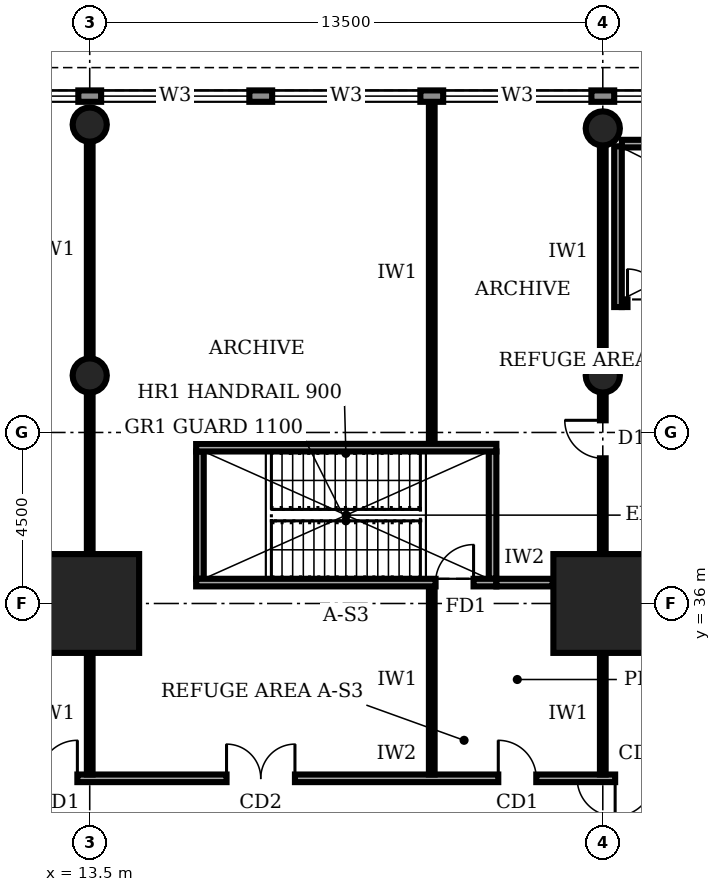
"""IFC4 building model, lengths in metres.
Left out: names, types, materials, properties, quantities, classifications, styles, units other than length and angle.
Written with IfcOpenShell. Run it as: python <this file> out.ifc"""

import sys

from ifc_helpers import new_model, si_unit, direction, frame, frame_2d, origin, origin_2d, place, context, subcontext, project, spatial, rectangle, circle, extrude, element, fill, save


model = new_model("IFC4")
c1 = context("Model", 3, precision=1e-05, world=origin(), true_north=direction((0.0, 1.0)))
c2 = subcontext(c1, "Body", "Model", "MODEL_VIEW")
j1 = project(units=[si_unit("LENGTHUNIT", "METRE"), si_unit("PLANEANGLEUNIT", "RADIAN")], contexts=[c1])
p1 = place(None, origin())
s1 = spatial("IfcSite", under=j1, at=p1, CompositionType="ELEMENT")
p2 = place(p1, origin())
s2 = spatial("IfcBuilding", under=s1, at=p2, CompositionType="ELEMENT")
p3 = place(p2, frame((0.0, 0.0, 16.0)))
s3 = spatial("IfcBuildingStorey", under=s2, at=p3, CompositionType="ELEMENT", Elevation=16.0)
for number, where, z_axis, x_axis in (
    (1, (13.5, 36.0, 0.0), (0.0, 0.0, 1.0), (1.0, 0.0, 0.0)),
    (2, (27.0, 36.0, 0.0), (0.0, 0.0, 1.0), (1.0, 0.0, 0.0)),
):
    element("IfcColumn", number, at=place(p3, frame(where, z_axis=z_axis, x_axis=x_axis)), inside=s3, PredefinedType="COLUMN", context=c2, shape_type="SweptSolid", body=[
        extrude(rectangle(XDim=2.6, YDim=2.6, at=origin_2d()), origin(), (0.0, 0.0, 1.0), 5.0),
    ])
for number, where, z_axis, x_axis in (
    (3, (13.5, 42.0, 0.0), (0.0, 0.0, 1.0), (1.0, 0.0, 0.0)),
    (4, (27.0, 42.0, 0.0), (0.0, 0.0, 1.0), (1.0, 0.0, 0.0)),
    (5, (13.5, 48.6, 0.0), (0.0, 0.0, 1.0), (1.0, 0.0, 0.0)),
    (6, (27.0, 48.5, 0.0), (0.0, 0.0, 1.0), (1.0, 0.0, 0.0)),
):
    element("IfcColumn", number, at=place(p3, frame(where, z_axis=z_axis, x_axis=x_axis)), inside=s3, PredefinedType="COLUMN", context=c2, shape_type="SweptSolid", body=[
        extrude(circle(Radius=0.45, at=origin_2d()), origin(), (0.0, 0.0, 1.0), 5.0),
    ])
p4 = place(p3, frame((98.98, 49.35, 0.0), z_axis=(0.0, 0.0, 1.0), x_axis=(-1.0, 0.0, 0.0)))
e7 = element("IfcWall", 7, at=p4, inside=s3, PredefinedType="STANDARD", context=c2, shape_type="SweptSolid", body=[
    extrude(rectangle(XDim=98.96, YDim=0.3, at=frame_2d((49.48, 0.0))), origin(), (0.0, 0.0, 1.0), 4.7),
])
p5 = place(p4, frame((94.78, 0.0, 0.95)))
e8 = element("IfcOpeningElement", 8, at=p5, cuts=e7, PredefinedType="OPENING", context=c2, shape_type="SweptSolid", body=[
    extrude(rectangle(XDim=3.9, YDim=1.8, at=frame_2d((1.95, 0.9))), frame((0.0, 0.16, 0.0), z_axis=(0.0, -1.0, 0.0), x_axis=(1.0, 0.0, 0.0)), (0.0, 0.0, 1.0), 0.32),
])
p6 = place(p4, frame((90.28, 0.0, 0.95)))
e9 = element("IfcOpeningElement", 9, at=p6, cuts=e7, PredefinedType="OPENING", context=c2, shape_type="SweptSolid", body=[
    extrude(rectangle(XDim=3.9, YDim=1.8, at=frame_2d((1.95, 0.9))), frame((0.0, 0.16, 0.0), z_axis=(0.0, -1.0, 0.0), x_axis=(1.0, 0.0, 0.0)), (0.0, 0.0, 1.0), 0.32),
])
p7 = place(p4, frame((85.78, 0.0, 0.95)))
e10 = element("IfcOpeningElement", 10, at=p7, cuts=e7, PredefinedType="OPENING", context=c2, shape_type="SweptSolid", body=[
    extrude(rectangle(XDim=3.9, YDim=1.8, at=frame_2d((1.95, 0.9))), frame((0.0, 0.16, 0.0), z_axis=(0.0, -1.0, 0.0), x_axis=(1.0, 0.0, 0.0)), (0.0, 0.0, 1.0), 0.32),
])
p8 = place(p4, frame((81.28, 0.0, 0.95)))
e11 = element("IfcOpeningElement", 11, at=p8, cuts=e7, PredefinedType="OPENING", context=c2, shape_type="SweptSolid", body=[
    extrude(rectangle(XDim=3.9, YDim=1.8, at=frame_2d((1.95, 0.9))), frame((0.0, 0.16, 0.0), z_axis=(0.0, -1.0, 0.0), x_axis=(1.0, 0.0, 0.0)), (0.0, 0.0, 1.0), 0.32),
])
p9 = place(p4, frame((76.78, 0.0, 0.95)))
e12 = element("IfcOpeningElement", 12, at=p9, cuts=e7, PredefinedType="OPENING", context=c2, shape_type="SweptSolid", body=[
    extrude(rectangle(XDim=3.9, YDim=1.8, at=frame_2d((1.95, 0.9))), frame((0.0, 0.16, 0.0), z_axis=(0.0, -1.0, 0.0), x_axis=(1.0, 0.0, 0.0)), (0.0, 0.0, 1.0), 0.32),
])
p10 = place(p4, frame((72.28, 0.0, 0.95)))
e13 = element("IfcOpeningElement", 13, at=p10, cuts=e7, PredefinedType="OPENING", context=c2, shape_type="SweptSolid", body=[
    extrude(rectangle(XDim=3.9, YDim=1.8, at=frame_2d((1.95, 0.9))), frame((0.0, 0.16, 0.0), z_axis=(0.0, -1.0, 0.0), x_axis=(1.0, 0.0, 0.0)), (0.0, 0.0, 1.0), 0.32),
])
p11 = place(p4, frame((67.78, 0.0, 0.95)))
e14 = element("IfcOpeningElement", 14, at=p11, cuts=e7, PredefinedType="OPENING", context=c2, shape_type="SweptSolid", body=[
    extrude(rectangle(XDim=3.9, YDim=1.8, at=frame_2d((1.95, 0.9))), frame((0.0, 0.16, 0.0), z_axis=(0.0, -1.0, 0.0), x_axis=(1.0, 0.0, 0.0)), (0.0, 0.0, 1.0), 0.32),
])
p12 = place(p4, frame((63.28, 0.0, 0.95)))
e15 = element("IfcOpeningElement", 15, at=p12, cuts=e7, PredefinedType="OPENING", context=c2, shape_type="SweptSolid", body=[
    extrude(rectangle(XDim=3.9, YDim=1.8, at=frame_2d((1.95, 0.9))), frame((0.0, 0.16, 0.0), z_axis=(0.0, -1.0, 0.0), x_axis=(1.0, 0.0, 0.0)), (0.0, 0.0, 1.0), 0.32),
])
p13 = place(p4, frame((58.78, 0.0, 0.95)))
e16 = element("IfcOpeningElement", 16, at=p13, cuts=e7, PredefinedType="OPENING", context=c2, shape_type="SweptSolid", body=[
    extrude(rectangle(XDim=3.9, YDim=1.8, at=frame_2d((1.95, 0.9))), frame((0.0, 0.16, 0.0), z_axis=(0.0, -1.0, 0.0), x_axis=(1.0, 0.0, 0.0)), (0.0, 0.0, 1.0), 0.32),
])
p14 = place(p4, frame((54.28, 0.0, 0.95)))
e17 = element("IfcOpeningElement", 17, at=p14, cuts=e7, PredefinedType="OPENING", context=c2, shape_type="SweptSolid", body=[
    extrude(rectangle(XDim=3.9, YDim=1.8, at=frame_2d((1.95, 0.9))), frame((0.0, 0.16, 0.0), z_axis=(0.0, -1.0, 0.0), x_axis=(1.0, 0.0, 0.0)), (0.0, 0.0, 1.0), 0.32),
])
p15 = place(p4, frame((49.78, 0.0, 0.95)))
e18 = element("IfcOpeningElement", 18, at=p15, cuts=e7, PredefinedType="OPENING", context=c2, shape_type="SweptSolid", body=[
    extrude(rectangle(XDim=3.9, YDim=1.8, at=frame_2d((1.95, 0.9))), frame((0.0, 0.16, 0.0), z_axis=(0.0, -1.0, 0.0), x_axis=(1.0, 0.0, 0.0)), (0.0, 0.0, 1.0), 0.32),
])
p16 = place(p4, frame((45.28, 0.0, 0.95)))
e19 = element("IfcOpeningElement", 19, at=p16, cuts=e7, PredefinedType="OPENING", context=c2, shape_type="SweptSolid", body=[
    extrude(rectangle(XDim=3.9, YDim=1.8, at=frame_2d((1.95, 0.9))), frame((0.0, 0.16, 0.0), z_axis=(0.0, -1.0, 0.0), x_axis=(1.0, 0.0, 0.0)), (0.0, 0.0, 1.0), 0.32),
])
p17 = place(p4, frame((40.78, 0.0, 0.95)))
e20 = element("IfcOpeningElement", 20, at=p17, cuts=e7, PredefinedType="OPENING", context=c2, shape_type="SweptSolid", body=[
    extrude(rectangle(XDim=3.9, YDim=1.8, at=frame_2d((1.95, 0.9))), frame((0.0, 0.16, 0.0), z_axis=(0.0, -1.0, 0.0), x_axis=(1.0, 0.0, 0.0)), (0.0, 0.0, 1.0), 0.32),
])
p18 = place(p4, frame((36.28, 0.0, 0.95)))
e21 = element("IfcOpeningElement", 21, at=p18, cuts=e7, PredefinedType="OPENING", context=c2, shape_type="SweptSolid", body=[
    extrude(rectangle(XDim=3.9, YDim=1.8, at=frame_2d((1.95, 0.9))), frame((0.0, 0.16, 0.0), z_axis=(0.0, -1.0, 0.0), x_axis=(1.0, 0.0, 0.0)), (0.0, 0.0, 1.0), 0.32),
])
p19 = place(p4, frame((31.78, 0.0, 0.95)))
e22 = element("IfcOpeningElement", 22, at=p19, cuts=e7, PredefinedType="OPENING", context=c2, shape_type="SweptSolid", body=[
    extrude(rectangle(XDim=3.9, YDim=1.8, at=frame_2d((1.95, 0.9))), frame((0.0, 0.16, 0.0), z_axis=(0.0, -1.0, 0.0), x_axis=(1.0, 0.0, 0.0)), (0.0, 0.0, 1.0), 0.32),
])
p20 = place(p4, frame((27.28, 0.0, 0.95)))
e23 = element("IfcOpeningElement", 23, at=p20, cuts=e7, PredefinedType="OPENING", context=c2, shape_type="SweptSolid", body=[
    extrude(rectangle(XDim=3.9, YDim=1.8, at=frame_2d((1.95, 0.9))), frame((0.0, 0.16, 0.0), z_axis=(0.0, -1.0, 0.0), x_axis=(1.0, 0.0, 0.0)), (0.0, 0.0, 1.0), 0.32),
])
p21 = place(p4, frame((22.78, 0.0, 0.95)))
e24 = element("IfcOpeningElement", 24, at=p21, cuts=e7, PredefinedType="OPENING", context=c2, shape_type="SweptSolid", body=[
    extrude(rectangle(XDim=3.9, YDim=1.8, at=frame_2d((1.95, 0.9))), frame((0.0, 0.16, 0.0), z_axis=(0.0, -1.0, 0.0), x_axis=(1.0, 0.0, 0.0)), (0.0, 0.0, 1.0), 0.32),
])
p22 = place(p4, frame((18.28, 0.0, 0.95)))
e25 = element("IfcOpeningElement", 25, at=p22, cuts=e7, PredefinedType="OPENING", context=c2, shape_type="SweptSolid", body=[
    extrude(rectangle(XDim=3.9, YDim=1.8, at=frame_2d((1.95, 0.9))), frame((0.0, 0.16, 0.0), z_axis=(0.0, -1.0, 0.0), x_axis=(1.0, 0.0, 0.0)), (0.0, 0.0, 1.0), 0.32),
])
p23 = place(p4, frame((13.78, 0.0, 0.95)))
e26 = element("IfcOpeningElement", 26, at=p23, cuts=e7, PredefinedType="OPENING", context=c2, shape_type="SweptSolid", body=[
    extrude(rectangle(XDim=3.9, YDim=1.8, at=frame_2d((1.95, 0.9))), frame((0.0, 0.16, 0.0), z_axis=(0.0, -1.0, 0.0), x_axis=(1.0, 0.0, 0.0)), (0.0, 0.0, 1.0), 0.32),
])
p24 = place(p4, frame((9.28, 0.0, 0.95)))
e27 = element("IfcOpeningElement", 27, at=p24, cuts=e7, PredefinedType="OPENING", context=c2, shape_type="SweptSolid", body=[
    extrude(rectangle(XDim=3.9, YDim=1.8, at=frame_2d((1.95, 0.9))), frame((0.0, 0.16, 0.0), z_axis=(0.0, -1.0, 0.0), x_axis=(1.0, 0.0, 0.0)), (0.0, 0.0, 1.0), 0.32),
])
p25 = place(p4, frame((4.78, 0.0, 0.95)))
e28 = element("IfcOpeningElement", 28, at=p25, cuts=e7, PredefinedType="OPENING", context=c2, shape_type="SweptSolid", body=[
    extrude(rectangle(XDim=3.9, YDim=1.8, at=frame_2d((1.95, 0.9))), frame((0.0, 0.16, 0.0), z_axis=(0.0, -1.0, 0.0), x_axis=(1.0, 0.0, 0.0)), (0.0, 0.0, 1.0), 0.32),
])
p26 = place(p3, frame((28.6, 31.4, 0.0), z_axis=(0.0, 0.0, 1.0), x_axis=(-1.0, 0.0, 0.0)))
e29 = element("IfcWall", 29, at=p26, inside=s3, PredefinedType="SOLIDWALL", context=c2, shape_type="SweptSolid", body=[
    extrude(rectangle(XDim=16.9, YDim=0.2, at=frame_2d((8.45, 0.0))), origin(), (0.0, 0.0, 1.0), 4.7),
])
p27 = place(p26, frame((15.425, 0.0, 0.0)))
e30 = element("IfcOpeningElement", 30, at=p27, cuts=e29, PredefinedType="OPENING", context=c2, shape_type="SweptSolid", body=[
    extrude(rectangle(XDim=1.0, YDim=2.1, at=frame_2d((0.5, 1.05))), frame((0.0, 0.11, 0.0), z_axis=(0.0, -1.0, 0.0), x_axis=(1.0, 0.0, 0.0)), (0.0, 0.0, 1.0), 0.22),
])
p28 = place(p26, frame((9.7, 0.0, 0.0)))
e31 = element("IfcOpeningElement", 31, at=p28, cuts=e29, PredefinedType="OPENING", context=c2, shape_type="SweptSolid", body=[
    extrude(rectangle(XDim=1.8, YDim=2.1, at=frame_2d((0.9, 1.05))), frame((0.0, 0.11, 0.0), z_axis=(0.0, -1.0, 0.0), x_axis=(1.0, 0.0, 0.0)), (0.0, 0.0, 1.0), 0.22),
])
p29 = place(p26, frame((0.275, 0.0, 0.0)))
e32 = element("IfcOpeningElement", 32, at=p29, cuts=e29, PredefinedType="OPENING", context=c2, shape_type="SweptSolid", body=[
    extrude(rectangle(XDim=1.0, YDim=2.1, at=frame_2d((0.5, 1.05))), frame((0.0, 0.11, 0.0), z_axis=(0.0, -1.0, 0.0), x_axis=(1.0, 0.0, 0.0)), (0.0, 0.0, 1.0), 0.22),
])
p30 = place(p26, frame((3.35, 0.0, 0.0)))
e33 = element("IfcOpeningElement", 33, at=p30, cuts=e29, PredefinedType="OPENING", context=c2, shape_type="SweptSolid", body=[
    extrude(rectangle(XDim=1.0, YDim=2.1, at=frame_2d((0.5, 1.05))), frame((0.0, 0.11, 0.0), z_axis=(0.0, -1.0, 0.0), x_axis=(1.0, 0.0, 0.0)), (0.0, 0.0, 1.0), 0.22),
])
p31 = place(p3, frame((13.5, 31.5, 0.0), z_axis=(0.0, 0.0, 1.0), x_axis=(0.0, 1.0, 0.0)))
e34 = element("IfcWall", 34, at=p31, inside=s3, PredefinedType="PARTITIONING", context=c2, shape_type="SweptSolid", body=[
    extrude(rectangle(XDim=3.18, YDim=0.15, at=frame_2d((1.59, 0.0))), origin(), (0.0, 0.0, 1.0), 3.8),
])
p32 = place(p3, frame((13.5, 37.32, 0.0), z_axis=(0.0, 0.0, 1.0), x_axis=(0.0, 1.0, 0.0)))
e35 = element("IfcWall", 35, at=p32, inside=s3, PredefinedType="PARTITIONING", context=c2, shape_type="SweptSolid", body=[
    extrude(rectangle(XDim=4.21, YDim=0.15, at=frame_2d((2.105, 0.0))), origin(), (0.0, 0.0, 1.0), 3.7),
])
p33 = place(p3, frame((13.5, 42.47, 0.0), z_axis=(0.0, 0.0, 1.0), x_axis=(0.0, 1.0, 0.0)))
e36 = element("IfcWall", 36, at=p33, inside=s3, PredefinedType="PARTITIONING", context=c2, shape_type="SweptSolid", body=[
    extrude(rectangle(XDim=5.66, YDim=0.15, at=frame_2d((2.83, 0.0))), origin(), (0.0, 0.0, 1.0), 3.7),
])
p34 = place(p3, frame((22.5, 31.5, 0.0), z_axis=(0.0, 0.0, 1.0), x_axis=(0.0, 1.0, 0.0)))
e37 = element("IfcWall", 37, at=p34, inside=s3, PredefinedType="PARTITIONING", context=c2, shape_type="SweptSolid", body=[
    extrude(rectangle(XDim=4.95, YDim=0.15, at=frame_2d((2.475, 0.0))), origin(), (0.0, 0.0, 1.0), 4.7),
])
p35 = place(p3, frame((22.5, 40.2, 0.0), z_axis=(0.0, 0.0, 1.0), x_axis=(0.0, 1.0, 0.0)))
e38 = element("IfcWall", 38, at=p35, inside=s3, PredefinedType="PARTITIONING", context=c2, shape_type="SweptSolid", body=[
    extrude(rectangle(XDim=9.0, YDim=0.15, at=frame_2d((4.5, 0.0))), origin(), (0.0, 0.0, 1.0), 4.7),
])
p36 = place(p3, frame((27.0, 31.5, 0.0), z_axis=(0.0, 0.0, 1.0), x_axis=(0.0, 1.0, 0.0)))
e39 = element("IfcWall", 39, at=p36, inside=s3, PredefinedType="PARTITIONING", context=c2, shape_type="SweptSolid", body=[
    extrude(rectangle(XDim=3.18, YDim=0.15, at=frame_2d((1.59, 0.0))), origin(), (0.0, 0.0, 1.0), 3.8),
])
p37 = place(p3, frame((27.0, 37.32, 0.0), z_axis=(0.0, 0.0, 1.0), x_axis=(0.0, 1.0, 0.0)))
e40 = element("IfcWall", 40, at=p37, inside=s3, PredefinedType="PARTITIONING", context=c2, shape_type="SweptSolid", body=[
    extrude(rectangle(XDim=4.21, YDim=0.15, at=frame_2d((2.105, 0.0))), origin(), (0.0, 0.0, 1.0), 3.7),
])
p38 = place(p37, frame((2.5, 0.0, 0.0)))
e41 = element("IfcOpeningElement", 41, at=p38, cuts=e40, PredefinedType="OPENING", context=c2, shape_type="SweptSolid", body=[
    extrude(rectangle(XDim=1.0, YDim=2.1, at=frame_2d((0.5, 1.05))), frame((0.0, 0.085, 0.0), z_axis=(0.0, -1.0, 0.0), x_axis=(1.0, 0.0, 0.0)), (0.0, 0.0, 1.0), 0.17),
])
p39 = place(p3, frame((27.0, 42.47, 0.0), z_axis=(0.0, 0.0, 1.0), x_axis=(0.0, 1.0, 0.0)))
e42 = element("IfcWall", 42, at=p39, inside=s3, PredefinedType="PARTITIONING", context=c2, shape_type="SweptSolid", body=[
    extrude(rectangle(XDim=5.56, YDim=0.15, at=frame_2d((2.78, 0.0))), origin(), (0.0, 0.0, 1.0), 3.7),
])
p40 = place(p3, frame((27.5, 43.9, 0.0), z_axis=(0.0, 0.0, 1.0), x_axis=(1.0, 0.0, 0.0)))
e43 = element("IfcWall", 43, at=p40, inside=s3, PredefinedType="SOLIDWALL", context=c2, shape_type="SweptSolid", body=[
    extrude(rectangle(XDim=8.0, YDim=0.2, at=frame_2d((4.0, 0.0))), origin(), (0.0, 0.0, 1.0), 4.7),
])
p41 = place(p40, frame((0.15, 0.0, 0.0)))
e44 = element("IfcOpeningElement", 44, at=p41, cuts=e43, PredefinedType="OPENING", context=c2, shape_type="SweptSolid", body=[
    extrude(rectangle(XDim=1.8, YDim=2.1, at=frame_2d((0.9, 1.05))), frame((0.0, 0.11, 0.0), z_axis=(0.0, -1.0, 0.0), x_axis=(1.0, 0.0, 0.0)), (0.0, 0.0, 1.0), 0.22),
])
p42 = place(p3, frame((27.5, 48.1, 0.0), z_axis=(0.0, 0.0, 1.0), x_axis=(1.0, 0.0, 0.0)))
e45 = element("IfcWall", 45, at=p42, inside=s3, PredefinedType="SOLIDWALL", context=c2, shape_type="SweptSolid", body=[
    extrude(rectangle(XDim=8.0, YDim=0.2, at=frame_2d((4.0, 0.0))), origin(), (0.0, 0.0, 1.0), 4.7),
])
p43 = place(p3, frame((27.4, 43.8, 0.0), z_axis=(0.0, 0.0, 1.0), x_axis=(0.0, 1.0, 0.0)))
e46 = element("IfcWall", 46, at=p43, inside=s3, PredefinedType="SOLIDWALL", context=c2, shape_type="SweptSolid", body=[
    extrude(rectangle(XDim=4.23, YDim=0.2, at=frame_2d((2.115, 0.0))), origin(), (0.0, 0.0, 1.0), 4.7),
])
p44 = place(p3, frame((24.2, 36.55, 0.0), z_axis=(0.0, 0.0, 1.0), x_axis=(1.0, 0.0, 0.0)))
e47 = element("IfcWall", 47, at=p44, inside=s3, PredefinedType="SOLIDWALL", context=c2, shape_type="SweptSolid", body=[
    extrude(rectangle(XDim=1.48, YDim=0.2, at=frame_2d((0.74, 0.0))), origin(), (0.0, 0.0, 1.0), 4.7),
])
p45 = place(p3, frame((16.3, 36.55, 0.0), z_axis=(0.0, 0.0, 1.0), x_axis=(1.0, 0.0, 0.0)))
e48 = element("IfcWall", 48, at=p45, inside=s3, PredefinedType="SOLIDWALL", context=c2, shape_type="SweptSolid", body=[
    extrude(rectangle(XDim=7.9, YDim=0.2, at=frame_2d((3.95, 0.0))), origin(), (0.0, 0.0, 1.0), 4.7),
])
p46 = place(p45, frame((6.3, 0.0, 0.0)))
e49 = element("IfcOpeningElement", 49, at=p46, cuts=e48, PredefinedType="OPENING", context=c2, shape_type="SweptSolid", body=[
    extrude(rectangle(XDim=1.0, YDim=2.1, at=frame_2d((0.5, 1.05))), frame((0.0, 0.11, 0.0), z_axis=(0.0, -1.0, 0.0), x_axis=(1.0, 0.0, 0.0)), (0.0, 0.0, 1.0), 0.22),
])
p47 = place(p3, frame((16.3, 40.1, 0.0), z_axis=(0.0, 0.0, 1.0), x_axis=(1.0, 0.0, 0.0)))
e50 = element("IfcWall", 50, at=p47, inside=s3, PredefinedType="SOLIDWALL", context=c2, shape_type="SweptSolid", body=[
    extrude(rectangle(XDim=7.9, YDim=0.2, at=frame_2d((3.95, 0.0))), origin(), (0.0, 0.0, 1.0), 4.7),
])
for number, where, z_axis, x_axis in (
    (51, (16.4, 36.65, 0.0), (0.0, 0.0, 1.0), (0.0, 1.0, 0.0)),
    (52, (24.1, 36.65, 0.0), (0.0, 0.0, 1.0), (0.0, 1.0, 0.0)),
):
    element("IfcWall", number, at=place(p3, frame(where, z_axis=z_axis, x_axis=x_axis)), inside=s3, PredefinedType="SOLIDWALL", context=c2, shape_type="SweptSolid", body=[
        extrude(rectangle(XDim=3.35, YDim=0.2, at=frame_2d((1.675, 0.0))), origin(), (0.0, 0.0, 1.0), 4.7),
    ])
p48 = place(p7, origin())
e53 = element("IfcWindow", 53, at=p48, inside=s3, PartitioningType="SINGLE_PANEL", PredefinedType="WINDOW", context=c2, shape_type="SweptSolid", body=[
    extrude(rectangle(XDim=3.9, YDim=1.8, at=frame_2d((1.95, 0.9))), frame((0.0, 0.03, 0.0), z_axis=(0.0, -1.0, 0.0), x_axis=(1.0, 0.0, 0.0)), (0.0, 0.0, 1.0), 0.06),
])
fill(e10, e53)
p49 = place(p8, origin())
e54 = element("IfcWindow", 54, at=p49, inside=s3, PartitioningType="SINGLE_PANEL", PredefinedType="WINDOW", context=c2, shape_type="SweptSolid", body=[
    extrude(rectangle(XDim=3.9, YDim=1.8, at=frame_2d((1.95, 0.9))), frame((0.0, 0.03, 0.0), z_axis=(0.0, -1.0, 0.0), x_axis=(1.0, 0.0, 0.0)), (0.0, 0.0, 1.0), 0.06),
])
fill(e11, e54)
p50 = place(p9, origin())
e55 = element("IfcWindow", 55, at=p50, inside=s3, PartitioningType="SINGLE_PANEL", PredefinedType="WINDOW", context=c2, shape_type="SweptSolid", body=[
    extrude(rectangle(XDim=3.9, YDim=1.8, at=frame_2d((1.95, 0.9))), frame((0.0, 0.03, 0.0), z_axis=(0.0, -1.0, 0.0), x_axis=(1.0, 0.0, 0.0)), (0.0, 0.0, 1.0), 0.06),
])
fill(e12, e55)
p51 = place(p10, origin())
e56 = element("IfcWindow", 56, at=p51, inside=s3, PartitioningType="SINGLE_PANEL", PredefinedType="WINDOW", context=c2, shape_type="SweptSolid", body=[
    extrude(rectangle(XDim=3.9, YDim=1.8, at=frame_2d((1.95, 0.9))), frame((0.0, 0.03, 0.0), z_axis=(0.0, -1.0, 0.0), x_axis=(1.0, 0.0, 0.0)), (0.0, 0.0, 1.0), 0.06),
])
fill(e13, e56)
p52 = place(p11, origin())
e57 = element("IfcWindow", 57, at=p52, inside=s3, PartitioningType="SINGLE_PANEL", PredefinedType="WINDOW", context=c2, shape_type="SweptSolid", body=[
    extrude(rectangle(XDim=3.9, YDim=1.8, at=frame_2d((1.95, 0.9))), frame((0.0, 0.03, 0.0), z_axis=(0.0, -1.0, 0.0), x_axis=(1.0, 0.0, 0.0)), (0.0, 0.0, 1.0), 0.06),
])
fill(e14, e57)
p53 = place(p27, frame((1.0, 0.0, 0.0), z_axis=(0.0, 0.0, 1.0), x_axis=(-1.0, 0.0, 0.0)))
e58 = element("IfcDoor", 58, at=p53, inside=s3, OperationType="SINGLE_SWING_RIGHT", PredefinedType="DOOR", context=c2, shape_type="SweptSolid", body=[
    extrude(rectangle(XDim=1.0, YDim=2.1, at=frame_2d((0.5, 1.05))), frame((0.0, 0.025, 0.0), z_axis=(0.0, -1.0, 0.0), x_axis=(1.0, 0.0, 0.0)), (0.0, 0.0, 1.0), 0.05),
])
fill(e30, e58)
p54 = place(p28, frame((1.8, 0.0, 0.0), z_axis=(0.0, 0.0, 1.0), x_axis=(-1.0, 0.0, 0.0)))
e59 = element("IfcDoor", 59, at=p54, inside=s3, OperationType="DOUBLE_DOOR_SINGLE_SWING", PredefinedType="DOOR", context=c2, shape_type="SweptSolid", body=[
    extrude(rectangle(XDim=1.8, YDim=2.1, at=frame_2d((0.9, 1.05))), frame((0.0, 0.025, 0.0), z_axis=(0.0, -1.0, 0.0), x_axis=(1.0, 0.0, 0.0)), (0.0, 0.0, 1.0), 0.05),
])
fill(e31, e59)
p55 = place(p29, origin())
e60 = element("IfcDoor", 60, at=p55, inside=s3, OperationType="SINGLE_SWING_RIGHT", PredefinedType="DOOR", context=c2, shape_type="SweptSolid", body=[
    extrude(rectangle(XDim=1.0, YDim=2.1, at=frame_2d((0.5, 1.05))), frame((0.0, 0.025, 0.0), z_axis=(0.0, -1.0, 0.0), x_axis=(1.0, 0.0, 0.0)), (0.0, 0.0, 1.0), 0.05),
])
fill(e32, e60)
p56 = place(p30, frame((1.0, 0.0, 0.0), z_axis=(0.0, 0.0, 1.0), x_axis=(-1.0, 0.0, 0.0)))
e61 = element("IfcDoor", 61, at=p56, inside=s3, OperationType="SINGLE_SWING_LEFT", PredefinedType="DOOR", context=c2, shape_type="SweptSolid", body=[
    extrude(rectangle(XDim=1.0, YDim=2.1, at=frame_2d((0.5, 1.05))), frame((0.0, 0.025, 0.0), z_axis=(0.0, -1.0, 0.0), x_axis=(1.0, 0.0, 0.0)), (0.0, 0.0, 1.0), 0.05),
])
fill(e33, e61)
p57 = place(p38, origin())
e62 = element("IfcDoor", 62, at=p57, inside=s3, OperationType="SINGLE_SWING_RIGHT", PredefinedType="DOOR", context=c2, shape_type="SweptSolid", body=[
    extrude(rectangle(XDim=1.0, YDim=2.1, at=frame_2d((0.5, 1.05))), frame((0.0, 0.025, 0.0), z_axis=(0.0, -1.0, 0.0), x_axis=(1.0, 0.0, 0.0)), (0.0, 0.0, 1.0), 0.05),
])
fill(e41, e62)
p58 = place(p41, origin())
e63 = element("IfcDoor", 63, at=p58, inside=s3, OperationType="DOUBLE_DOOR_SINGLE_SWING", PredefinedType="DOOR", context=c2, shape_type="SweptSolid", body=[
    extrude(rectangle(XDim=1.8, YDim=2.1, at=frame_2d((0.9, 1.05))), frame((0.0, 0.025, 0.0), z_axis=(0.0, -1.0, 0.0), x_axis=(1.0, 0.0, 0.0)), (0.0, 0.0, 1.0), 0.05),
])
fill(e44, e63)
p59 = place(p46, origin())
e64 = element("IfcDoor", 64, at=p59, inside=s3, OperationType="SINGLE_SWING_RIGHT", PredefinedType="DOOR", context=c2, shape_type="SweptSolid", body=[
    extrude(rectangle(XDim=1.0, YDim=2.1, at=frame_2d((0.5, 1.05))), frame((0.0, 0.025, 0.0), z_axis=(0.0, -1.0, 0.0), x_axis=(1.0, 0.0, 0.0)), (0.0, 0.0, 1.0), 0.05),
])
fill(e49, e64)
save(model, sys.argv[1])
